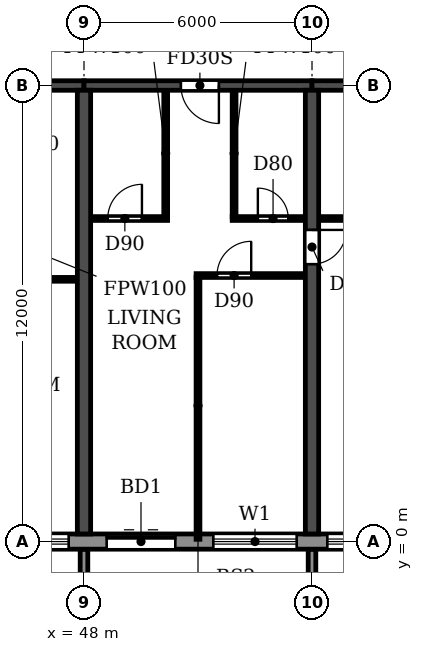
"""IFC4 building model, lengths in metres.
Left out: names, types, materials, properties, quantities, classifications, styles, units other than length and angle.
Written with IfcOpenShell. Run it as: python <this file> out.ifc"""

import sys

from ifc_helpers import new_model, si_unit, direction, frame, frame_2d, origin, place, context, subcontext, project, spatial, polyline, rectangle, outline, extrude, source, transform, mapped, element, fill, save


model = new_model("IFC4")
c1 = context("Model", 3, precision=1e-05, world=origin(), true_north=direction((0.0, 1.0)))
c2 = subcontext(c1, "Body", "Model", "MODEL_VIEW")
j1 = project(units=[si_unit("LENGTHUNIT", "METRE"), si_unit("PLANEANGLEUNIT", "RADIAN")], contexts=[c1])
p1 = place(None, origin())
s1 = spatial("IfcSite", under=j1, at=p1, CompositionType="ELEMENT")
p2 = place(p1, origin())
s2 = spatial("IfcBuilding", under=s1, at=p2, CompositionType="ELEMENT")
p3 = place(p2, frame((0.0, 0.0, 112.5)))
s3 = spatial("IfcBuildingStorey", under=s2, at=p3, CompositionType="ELEMENT", Elevation=112.5)
p4 = place(p3, frame((48.0, 0.2, 0.0), z_axis=(0.0, 0.0, 1.0), x_axis=(0.0, 1.0, 0.0)))
e1 = element("IfcWall", 1, at=p4, inside=s3, PredefinedType="SHEAR", context=c2, shape_type="SweptSolid", body=[
    extrude(rectangle(XDim=11.675, YDim=0.35, at=frame_2d((5.837, 0.0))), origin(), (0.0, 0.0, 1.0), 2.95),
])
p5 = place(p3, frame((54.0, 0.2, 0.0), z_axis=(0.0, 0.0, 1.0), x_axis=(0.0, 1.0, 0.0)))
e2 = element("IfcWall", 2, at=p5, inside=s3, PredefinedType="SHEAR", context=c2, shape_type="SweptSolid", body=[
    extrude(rectangle(XDim=11.675, YDim=0.35, at=frame_2d((5.837, 0.0))), origin(), (0.0, 0.0, 1.0), 2.95),
])
p6 = place(p5, frame((7.1, 0.0, 0.0)))
e3 = element("IfcOpeningElement", 3, at=p6, cuts=e2, PredefinedType="OPENING", context=c2, shape_type="SweptSolid", body=[
    extrude(rectangle(XDim=0.9, YDim=2.1, at=frame_2d((0.45, 1.05))), frame((0.0, 0.185, 0.0), z_axis=(0.0, -1.0, 0.0), x_axis=(1.0, 0.0, 0.0)), (0.0, 0.0, 1.0), 0.37),
])
p7 = place(p3, frame((42.0, 12.0, 0.0), z_axis=(0.0, 0.0, 1.0), x_axis=(1.0, 0.0, 0.0)))
e4 = element("IfcWall", 4, at=p7, inside=s3, PredefinedType="SHEAR", context=c2, shape_type="SweptSolid", body=[
    extrude(rectangle(XDim=6.0, YDim=0.25, at=frame_2d((3.0, 0.0))), origin(), (0.0, 0.0, 1.0), 2.35),
])
p8 = place(p7, frame((2.45, 0.0, 0.0)))
e5 = element("IfcOpeningElement", 5, at=p8, cuts=e4, PredefinedType="OPENING", context=c2, shape_type="SweptSolid", body=[
    extrude(rectangle(XDim=1.0, YDim=2.1, at=frame_2d((0.5, 1.05))), frame((0.0, 0.135, 0.0), z_axis=(0.0, -1.0, 0.0), x_axis=(1.0, 0.0, 0.0)), (0.0, 0.0, 1.0), 0.27),
])
p9 = place(p3, frame((48.0, 12.0, 0.0), z_axis=(0.0, 0.0, 1.0), x_axis=(1.0, 0.0, 0.0)))
e6 = element("IfcWall", 6, at=p9, inside=s3, PredefinedType="SHEAR", context=c2, shape_type="SweptSolid", body=[
    extrude(rectangle(XDim=6.0, YDim=0.25, at=frame_2d((3.0, 0.0))), origin(), (0.0, 0.0, 1.0), 2.35),
])
p10 = place(p9, frame((2.55, 0.0, 0.0)))
e7 = element("IfcOpeningElement", 7, at=p10, cuts=e6, PredefinedType="OPENING", context=c2, shape_type="SweptSolid", body=[
    extrude(rectangle(XDim=1.0, YDim=2.1, at=frame_2d((0.5, 1.05))), frame((0.0, 0.135, 0.0), z_axis=(0.0, -1.0, 0.0), x_axis=(1.0, 0.0, 0.0)), (0.0, 0.0, 1.0), 0.27),
])
p11 = place(p3, frame((54.0, 12.0, 0.0), z_axis=(0.0, 0.0, 1.0), x_axis=(1.0, 0.0, 0.0)))
e8 = element("IfcWall", 8, at=p11, inside=s3, PredefinedType="SHEAR", context=c2, shape_type="SweptSolid", body=[
    extrude(rectangle(XDim=6.0, YDim=0.25, at=frame_2d((3.0, 0.0))), origin(), (0.0, 0.0, 1.0), 2.35),
])
p12 = place(p3, frame((16.683, 0.0, 0.0), z_axis=(0.0, 0.0, 1.0), x_axis=(1.0, 0.0, 0.0)))
e9 = element("IfcWall", 9, at=p12, inside=s3, PredefinedType="STANDARD", context=c2, shape_type="SweptSolid", body=[
    extrude(rectangle(XDim=68.634, YDim=0.4, at=frame_2d((34.317, 0.0))), origin(), (0.0, 0.0, 1.0), 2.95),
])
p13 = place(p12, frame((1.717, 0.0, 0.9)))
e10 = element("IfcOpeningElement", 10, at=p13, cuts=e9, PredefinedType="OPENING", context=c2, shape_type="SweptSolid", body=[
    extrude(rectangle(XDim=2.2, YDim=1.5, at=frame_2d((1.1, 0.75))), frame((0.0, 0.21, 0.0), z_axis=(0.0, -1.0, 0.0), x_axis=(1.0, 0.0, 0.0)), (0.0, 0.0, 1.0), 0.42),
])
p14 = place(p12, frame((4.717, 0.0, 0.9)))
e11 = element("IfcOpeningElement", 11, at=p14, cuts=e9, PredefinedType="OPENING", context=c2, shape_type="SweptSolid", body=[
    extrude(rectangle(XDim=2.2, YDim=1.5, at=frame_2d((1.1, 0.75))), frame((0.0, 0.21, 0.0), z_axis=(0.0, -1.0, 0.0), x_axis=(1.0, 0.0, 0.0)), (0.0, 0.0, 1.0), 0.42),
])
p15 = place(p12, frame((7.717, 0.0, 0.9)))
e12 = element("IfcOpeningElement", 12, at=p15, cuts=e9, PredefinedType="OPENING", context=c2, shape_type="SweptSolid", body=[
    extrude(rectangle(XDim=2.2, YDim=1.5, at=frame_2d((1.1, 0.75))), frame((0.0, 0.21, 0.0), z_axis=(0.0, -1.0, 0.0), x_axis=(1.0, 0.0, 0.0)), (0.0, 0.0, 1.0), 0.42),
])
p16 = place(p12, frame((10.917, 0.0, 0.0)))
e13 = element("IfcOpeningElement", 13, at=p16, cuts=e9, PredefinedType="OPENING", context=c2, shape_type="SweptSolid", body=[
    extrude(rectangle(XDim=1.8, YDim=2.4, at=frame_2d((0.9, 1.2))), frame((0.0, 0.21, 0.0), z_axis=(0.0, -1.0, 0.0), x_axis=(1.0, 0.0, 0.0)), (0.0, 0.0, 1.0), 0.42),
])
p17 = place(p12, frame((13.717, 0.0, 0.9)))
e14 = element("IfcOpeningElement", 14, at=p17, cuts=e9, PredefinedType="OPENING", context=c2, shape_type="SweptSolid", body=[
    extrude(rectangle(XDim=2.2, YDim=1.5, at=frame_2d((1.1, 0.75))), frame((0.0, 0.21, 0.0), z_axis=(0.0, -1.0, 0.0), x_axis=(1.0, 0.0, 0.0)), (0.0, 0.0, 1.0), 0.42),
])
p18 = place(p12, frame((16.717, 0.0, 0.9)))
e15 = element("IfcOpeningElement", 15, at=p18, cuts=e9, PredefinedType="OPENING", context=c2, shape_type="SweptSolid", body=[
    extrude(rectangle(XDim=2.2, YDim=1.5, at=frame_2d((1.1, 0.75))), frame((0.0, 0.21, 0.0), z_axis=(0.0, -1.0, 0.0), x_axis=(1.0, 0.0, 0.0)), (0.0, 0.0, 1.0), 0.42),
])
p19 = place(p12, frame((19.717, 0.0, 0.9)))
e16 = element("IfcOpeningElement", 16, at=p19, cuts=e9, PredefinedType="OPENING", context=c2, shape_type="SweptSolid", body=[
    extrude(rectangle(XDim=2.2, YDim=1.5, at=frame_2d((1.1, 0.75))), frame((0.0, 0.21, 0.0), z_axis=(0.0, -1.0, 0.0), x_axis=(1.0, 0.0, 0.0)), (0.0, 0.0, 1.0), 0.42),
])
p20 = place(p12, frame((22.717, 0.0, 0.9)))
e17 = element("IfcOpeningElement", 17, at=p20, cuts=e9, PredefinedType="OPENING", context=c2, shape_type="SweptSolid", body=[
    extrude(rectangle(XDim=2.2, YDim=1.5, at=frame_2d((1.1, 0.75))), frame((0.0, 0.21, 0.0), z_axis=(0.0, -1.0, 0.0), x_axis=(1.0, 0.0, 0.0)), (0.0, 0.0, 1.0), 0.42),
])
p21 = place(p12, frame((25.717, 0.0, 0.9)))
e18 = element("IfcOpeningElement", 18, at=p21, cuts=e9, PredefinedType="OPENING", context=c2, shape_type="SweptSolid", body=[
    extrude(rectangle(XDim=2.2, YDim=1.5, at=frame_2d((1.1, 0.75))), frame((0.0, 0.21, 0.0), z_axis=(0.0, -1.0, 0.0), x_axis=(1.0, 0.0, 0.0)), (0.0, 0.0, 1.0), 0.42),
])
p22 = place(p12, frame((28.717, 0.0, 0.9)))
e19 = element("IfcOpeningElement", 19, at=p22, cuts=e9, PredefinedType="OPENING", context=c2, shape_type="SweptSolid", body=[
    extrude(rectangle(XDim=2.2, YDim=1.5, at=frame_2d((1.1, 0.75))), frame((0.0, 0.21, 0.0), z_axis=(0.0, -1.0, 0.0), x_axis=(1.0, 0.0, 0.0)), (0.0, 0.0, 1.0), 0.42),
])
p23 = place(p12, frame((31.917, 0.0, 0.0)))
e20 = element("IfcOpeningElement", 20, at=p23, cuts=e9, PredefinedType="OPENING", context=c2, shape_type="SweptSolid", body=[
    extrude(rectangle(XDim=1.8, YDim=2.4, at=frame_2d((0.9, 1.2))), frame((0.0, 0.21, 0.0), z_axis=(0.0, -1.0, 0.0), x_axis=(1.0, 0.0, 0.0)), (0.0, 0.0, 1.0), 0.42),
])
p24 = place(p12, frame((34.717, 0.0, 0.9)))
e21 = element("IfcOpeningElement", 21, at=p24, cuts=e9, PredefinedType="OPENING", context=c2, shape_type="SweptSolid", body=[
    extrude(rectangle(XDim=2.2, YDim=1.5, at=frame_2d((1.1, 0.75))), frame((0.0, 0.21, 0.0), z_axis=(0.0, -1.0, 0.0), x_axis=(1.0, 0.0, 0.0)), (0.0, 0.0, 1.0), 0.42),
])
p25 = place(p12, frame((37.717, 0.0, 0.9)))
e22 = element("IfcOpeningElement", 22, at=p25, cuts=e9, PredefinedType="OPENING", context=c2, shape_type="SweptSolid", body=[
    extrude(rectangle(XDim=2.2, YDim=1.5, at=frame_2d((1.1, 0.75))), frame((0.0, 0.21, 0.0), z_axis=(0.0, -1.0, 0.0), x_axis=(1.0, 0.0, 0.0)), (0.0, 0.0, 1.0), 0.42),
])
p26 = place(p12, frame((40.717, 0.0, 0.9)))
e23 = element("IfcOpeningElement", 23, at=p26, cuts=e9, PredefinedType="OPENING", context=c2, shape_type="SweptSolid", body=[
    extrude(rectangle(XDim=2.2, YDim=1.5, at=frame_2d((1.1, 0.75))), frame((0.0, 0.21, 0.0), z_axis=(0.0, -1.0, 0.0), x_axis=(1.0, 0.0, 0.0)), (0.0, 0.0, 1.0), 0.42),
])
p27 = place(p12, frame((43.717, 0.0, 0.9)))
e24 = element("IfcOpeningElement", 24, at=p27, cuts=e9, PredefinedType="OPENING", context=c2, shape_type="SweptSolid", body=[
    extrude(rectangle(XDim=2.2, YDim=1.5, at=frame_2d((1.1, 0.75))), frame((0.0, 0.21, 0.0), z_axis=(0.0, -1.0, 0.0), x_axis=(1.0, 0.0, 0.0)), (0.0, 0.0, 1.0), 0.42),
])
p28 = place(p12, frame((46.917, 0.0, 0.0)))
e25 = element("IfcOpeningElement", 25, at=p28, cuts=e9, PredefinedType="OPENING", context=c2, shape_type="SweptSolid", body=[
    extrude(rectangle(XDim=1.8, YDim=2.4, at=frame_2d((0.9, 1.2))), frame((0.0, 0.21, 0.0), z_axis=(0.0, -1.0, 0.0), x_axis=(1.0, 0.0, 0.0)), (0.0, 0.0, 1.0), 0.42),
])
p29 = place(p12, frame((49.717, 0.0, 0.9)))
e26 = element("IfcOpeningElement", 26, at=p29, cuts=e9, PredefinedType="OPENING", context=c2, shape_type="SweptSolid", body=[
    extrude(rectangle(XDim=2.2, YDim=1.5, at=frame_2d((1.1, 0.75))), frame((0.0, 0.21, 0.0), z_axis=(0.0, -1.0, 0.0), x_axis=(1.0, 0.0, 0.0)), (0.0, 0.0, 1.0), 0.42),
])
p30 = place(p12, frame((52.717, 0.0, 0.9)))
e27 = element("IfcOpeningElement", 27, at=p30, cuts=e9, PredefinedType="OPENING", context=c2, shape_type="SweptSolid", body=[
    extrude(rectangle(XDim=2.2, YDim=1.5, at=frame_2d((1.1, 0.75))), frame((0.0, 0.21, 0.0), z_axis=(0.0, -1.0, 0.0), x_axis=(1.0, 0.0, 0.0)), (0.0, 0.0, 1.0), 0.42),
])
p31 = place(p12, frame((55.717, 0.0, 0.9)))
e28 = element("IfcOpeningElement", 28, at=p31, cuts=e9, PredefinedType="OPENING", context=c2, shape_type="SweptSolid", body=[
    extrude(rectangle(XDim=2.2, YDim=1.5, at=frame_2d((1.1, 0.75))), frame((0.0, 0.21, 0.0), z_axis=(0.0, -1.0, 0.0), x_axis=(1.0, 0.0, 0.0)), (0.0, 0.0, 1.0), 0.42),
])
p32 = place(p12, frame((58.717, 0.0, 0.9)))
e29 = element("IfcOpeningElement", 29, at=p32, cuts=e9, PredefinedType="OPENING", context=c2, shape_type="SweptSolid", body=[
    extrude(rectangle(XDim=2.2, YDim=1.5, at=frame_2d((1.1, 0.75))), frame((0.0, 0.21, 0.0), z_axis=(0.0, -1.0, 0.0), x_axis=(1.0, 0.0, 0.0)), (0.0, 0.0, 1.0), 0.42),
])
p33 = place(p12, frame((61.717, 0.0, 0.9)))
e30 = element("IfcOpeningElement", 30, at=p33, cuts=e9, PredefinedType="OPENING", context=c2, shape_type="SweptSolid", body=[
    extrude(rectangle(XDim=2.2, YDim=1.5, at=frame_2d((1.1, 0.75))), frame((0.0, 0.21, 0.0), z_axis=(0.0, -1.0, 0.0), x_axis=(1.0, 0.0, 0.0)), (0.0, 0.0, 1.0), 0.42),
])
p34 = place(p12, frame((64.717, 0.0, 0.9)))
e31 = element("IfcOpeningElement", 31, at=p34, cuts=e9, PredefinedType="OPENING", context=c2, shape_type="SweptSolid", body=[
    extrude(rectangle(XDim=2.2, YDim=1.5, at=frame_2d((1.1, 0.75))), frame((0.0, 0.21, 0.0), z_axis=(0.0, -1.0, 0.0), x_axis=(1.0, 0.0, 0.0)), (0.0, 0.0, 1.0), 0.42),
])
m1 = source(origin(), c2, "Body", "SweptSolid", [
    extrude(outline(polyline([(0.0, 0.0), (0.2, 0.0), (0.2, 1.65), (0.0, 1.65), (0.0, 0.0)])), origin(), (0.0, 0.0, 1.0), 3.1),
])
for number, where in (
    (32, (47.9, -1.85, 0.0)),
    (33, (53.9, -1.85, 0.0)),
):
    element("IfcWall", number, at=place(p3, frame(where)), inside=s3, PredefinedType="STANDARD", context=c2, shape_type="MappedRepresentation", body=[
        mapped(m1, transform((0.0, 0.0, 0.0))),
    ])
p35 = place(p3, frame((45.8, 6.9, 0.0), z_axis=(0.0, 0.0, 1.0), x_axis=(1.0, 0.0, 0.0)))
e34 = element("IfcWall", 34, at=p35, inside=s3, PredefinedType="PARTITIONING", context=c2, shape_type="SweptSolid", body=[
    extrude(rectangle(XDim=2.015, YDim=0.1, at=frame_2d((1.007, 0.0))), origin(), (0.0, 0.0, 1.0), 2.95),
])
p36 = place(p3, frame((50.95, 7.0, 0.0), z_axis=(0.0, 0.0, 1.0), x_axis=(1.0, 0.0, 0.0)))
e35 = element("IfcWall", 35, at=p36, inside=s3, PredefinedType="PARTITIONING", context=c2, shape_type="SweptSolid", body=[
    extrude(rectangle(XDim=2.865, YDim=0.1, at=frame_2d((1.433, 0.0))), origin(), (0.0, 0.0, 1.0), 2.95),
])
p37 = place(p36, frame((0.55, 0.0, 0.0)))
e36 = element("IfcOpeningElement", 36, at=p37, cuts=e35, PredefinedType="OPENING", context=c2, shape_type="SweptSolid", body=[
    extrude(rectangle(XDim=0.9, YDim=2.1, at=frame_2d((0.45, 1.05))), frame((0.0, 0.06, 0.0), z_axis=(0.0, -1.0, 0.0), x_axis=(1.0, 0.0, 0.0)), (0.0, 0.0, 1.0), 0.12),
])
p38 = place(p3, frame((48.185, 8.5, 0.0), z_axis=(0.0, 0.0, 1.0), x_axis=(1.0, 0.0, 0.0)))
e37 = element("IfcWall", 37, at=p38, inside=s3, PredefinedType="PARTITIONING", context=c2, shape_type="SweptSolid", body=[
    extrude(rectangle(XDim=2.015, YDim=0.1, at=frame_2d((1.007, 0.0))), origin(), (0.0, 0.0, 1.0), 2.95),
])
p39 = place(p38, frame((0.44, 0.0, 0.0)))
e38 = element("IfcOpeningElement", 38, at=p39, cuts=e37, PredefinedType="OPENING", context=c2, shape_type="SweptSolid", body=[
    extrude(rectangle(XDim=0.9, YDim=2.1, at=frame_2d((0.45, 1.05))), frame((0.0, 0.06, 0.0), z_axis=(0.0, -1.0, 0.0), x_axis=(1.0, 0.0, 0.0)), (0.0, 0.0, 1.0), 0.12),
])
p40 = place(p3, frame((51.9, 8.5, 0.0), z_axis=(0.0, 0.0, 1.0), x_axis=(1.0, 0.0, 0.0)))
e39 = element("IfcWall", 39, at=p40, inside=s3, PredefinedType="PARTITIONING", context=c2, shape_type="SweptSolid", body=[
    extrude(rectangle(XDim=1.915, YDim=0.1, at=frame_2d((0.958, 0.0))), origin(), (0.0, 0.0, 1.0), 2.95),
])
p41 = place(p40, frame((0.675, 0.0, 0.0)))
e40 = element("IfcOpeningElement", 40, at=p41, cuts=e39, PredefinedType="OPENING", context=c2, shape_type="SweptSolid", body=[
    extrude(rectangle(XDim=0.8, YDim=2.1, at=frame_2d((0.4, 1.05))), frame((0.0, 0.06, 0.0), z_axis=(0.0, -1.0, 0.0), x_axis=(1.0, 0.0, 0.0)), (0.0, 0.0, 1.0), 0.12),
])
p42 = place(p3, frame((54.185, 8.5, 0.0), z_axis=(0.0, 0.0, 1.0), x_axis=(1.0, 0.0, 0.0)))
e41 = element("IfcWall", 41, at=p42, inside=s3, PredefinedType="PARTITIONING", context=c2, shape_type="SweptSolid", body=[
    extrude(rectangle(XDim=2.715, YDim=0.1, at=frame_2d((1.357, 0.0))), origin(), (0.0, 0.0, 1.0), 2.95),
])
p43 = place(p42, frame((0.915, 0.0, 0.0)))
e42 = element("IfcOpeningElement", 42, at=p43, cuts=e41, PredefinedType="OPENING", context=c2, shape_type="SweptSolid", body=[
    extrude(rectangle(XDim=0.8, YDim=2.1, at=frame_2d((0.4, 1.05))), frame((0.0, 0.06, 0.0), z_axis=(0.0, -1.0, 0.0), x_axis=(1.0, 0.0, 0.0)), (0.0, 0.0, 1.0), 0.12),
])
p44 = place(p3, frame((50.15, 8.55, 0.0), z_axis=(0.0, 0.0, 1.0), x_axis=(0.0, 1.0, 0.0)))
e43 = element("IfcWall", 43, at=p44, inside=s3, PredefinedType="PARTITIONING", context=c2, shape_type="SweptSolid", body=[
    extrude(rectangle(XDim=3.315, YDim=0.1, at=frame_2d((1.657, 0.0))), origin(), (0.0, 0.0, 1.0), 2.95),
])
p45 = place(p3, frame((51.0, 0.06, 0.0), z_axis=(0.0, 0.0, 1.0), x_axis=(0.0, 1.0, 0.0)))
e44 = element("IfcWall", 44, at=p45, inside=s3, PredefinedType="PARTITIONING", context=c2, shape_type="SweptSolid", body=[
    extrude(rectangle(XDim=6.89, YDim=0.1, at=frame_2d((3.445, 0.0))), origin(), (0.0, 0.0, 1.0), 2.95),
])
p46 = place(p3, frame((51.95, 8.55, 0.0), z_axis=(0.0, 0.0, 1.0), x_axis=(0.0, 1.0, 0.0)))
e45 = element("IfcWall", 45, at=p46, inside=s3, PredefinedType="PARTITIONING", context=c2, shape_type="SweptSolid", body=[
    extrude(rectangle(XDim=3.315, YDim=0.1, at=frame_2d((1.657, 0.0))), origin(), (0.0, 0.0, 1.0), 2.95),
])
p47 = place(p22, origin())
e46 = element("IfcWindow", 46, at=p47, inside=s3, PartitioningType="DOUBLE_PANEL_HORIZONTAL", PredefinedType="WINDOW", context=c2, shape_type="SweptSolid", body=[
    extrude(rectangle(XDim=2.2, YDim=1.5, at=frame_2d((1.1, 0.75))), frame((0.0, 0.03, 0.0), z_axis=(0.0, -1.0, 0.0), x_axis=(1.0, 0.0, 0.0)), (0.0, 0.0, 1.0), 0.06),
])
fill(e19, e46)
p48 = place(p23, origin())
e47 = element("IfcDoor", 47, at=p48, inside=s3, OperationType="DOUBLE_DOOR_SLIDING", PredefinedType="DOOR", context=c2, shape_type="SweptSolid", body=[
    extrude(rectangle(XDim=1.8, YDim=2.4, at=frame_2d((0.9, 1.2))), frame((0.0, 0.025, 0.0), z_axis=(0.0, -1.0, 0.0), x_axis=(1.0, 0.0, 0.0)), (0.0, 0.0, 1.0), 0.05),
])
fill(e20, e47)
p49 = place(p24, origin())
e48 = element("IfcWindow", 48, at=p49, inside=s3, PartitioningType="DOUBLE_PANEL_HORIZONTAL", PredefinedType="WINDOW", context=c2, shape_type="SweptSolid", body=[
    extrude(rectangle(XDim=2.2, YDim=1.5, at=frame_2d((1.1, 0.75))), frame((0.0, 0.03, 0.0), z_axis=(0.0, -1.0, 0.0), x_axis=(1.0, 0.0, 0.0)), (0.0, 0.0, 1.0), 0.06),
])
fill(e21, e48)
p50 = place(p25, origin())
e49 = element("IfcWindow", 49, at=p50, inside=s3, PartitioningType="DOUBLE_PANEL_HORIZONTAL", PredefinedType="WINDOW", context=c2, shape_type="SweptSolid", body=[
    extrude(rectangle(XDim=2.2, YDim=1.5, at=frame_2d((1.1, 0.75))), frame((0.0, 0.03, 0.0), z_axis=(0.0, -1.0, 0.0), x_axis=(1.0, 0.0, 0.0)), (0.0, 0.0, 1.0), 0.06),
])
fill(e22, e49)
p51 = place(p39, origin())
e50 = element("IfcDoor", 50, at=p51, inside=s3, OperationType="SINGLE_SWING_RIGHT", PredefinedType="DOOR", context=c2, shape_type="SweptSolid", body=[
    extrude(rectangle(XDim=0.9, YDim=2.1, at=frame_2d((0.45, 1.05))), frame((0.0, 0.025, 0.0), z_axis=(0.0, -1.0, 0.0), x_axis=(1.0, 0.0, 0.0)), (0.0, 0.0, 1.0), 0.05),
])
fill(e38, e50)
p52 = place(p10, frame((1.0, 0.0, 0.0), z_axis=(0.0, 0.0, 1.0), x_axis=(-1.0, 0.0, 0.0)))
e51 = element("IfcDoor", 51, at=p52, inside=s3, OperationType="SINGLE_SWING_LEFT", PredefinedType="DOOR", context=c2, shape_type="SweptSolid", body=[
    extrude(rectangle(XDim=1.0, YDim=2.1, at=frame_2d((0.5, 1.05))), frame((0.0, 0.025, 0.0), z_axis=(0.0, -1.0, 0.0), x_axis=(1.0, 0.0, 0.0)), (0.0, 0.0, 1.0), 0.05),
])
fill(e7, e51)
p53 = place(p37, origin())
e52 = element("IfcDoor", 52, at=p53, inside=s3, OperationType="SINGLE_SWING_RIGHT", PredefinedType="DOOR", context=c2, shape_type="SweptSolid", body=[
    extrude(rectangle(XDim=0.9, YDim=2.1, at=frame_2d((0.45, 1.05))), frame((0.0, 0.025, 0.0), z_axis=(0.0, -1.0, 0.0), x_axis=(1.0, 0.0, 0.0)), (0.0, 0.0, 1.0), 0.05),
])
fill(e36, e52)
p54 = place(p41, origin())
e53 = element("IfcDoor", 53, at=p54, inside=s3, OperationType="SINGLE_SWING_LEFT", PredefinedType="DOOR", context=c2, shape_type="SweptSolid", body=[
    extrude(rectangle(XDim=0.8, YDim=2.1, at=frame_2d((0.4, 1.05))), frame((0.0, 0.025, 0.0), z_axis=(0.0, -1.0, 0.0), x_axis=(1.0, 0.0, 0.0)), (0.0, 0.0, 1.0), 0.05),
])
fill(e40, e53)
p55 = place(p6, frame((0.9, 0.0, 0.0), z_axis=(0.0, 0.0, 1.0), x_axis=(-1.0, 0.0, 0.0)))
e54 = element("IfcDoor", 54, at=p55, inside=s3, OperationType="SINGLE_SWING_LEFT", PredefinedType="DOOR", context=c2, shape_type="SweptSolid", body=[
    extrude(rectangle(XDim=0.9, YDim=2.1, at=frame_2d((0.45, 1.05))), frame((0.0, 0.025, 0.0), z_axis=(0.0, -1.0, 0.0), x_axis=(1.0, 0.0, 0.0)), (0.0, 0.0, 1.0), 0.05),
])
fill(e3, e54)
save(model, sys.argv[1])
